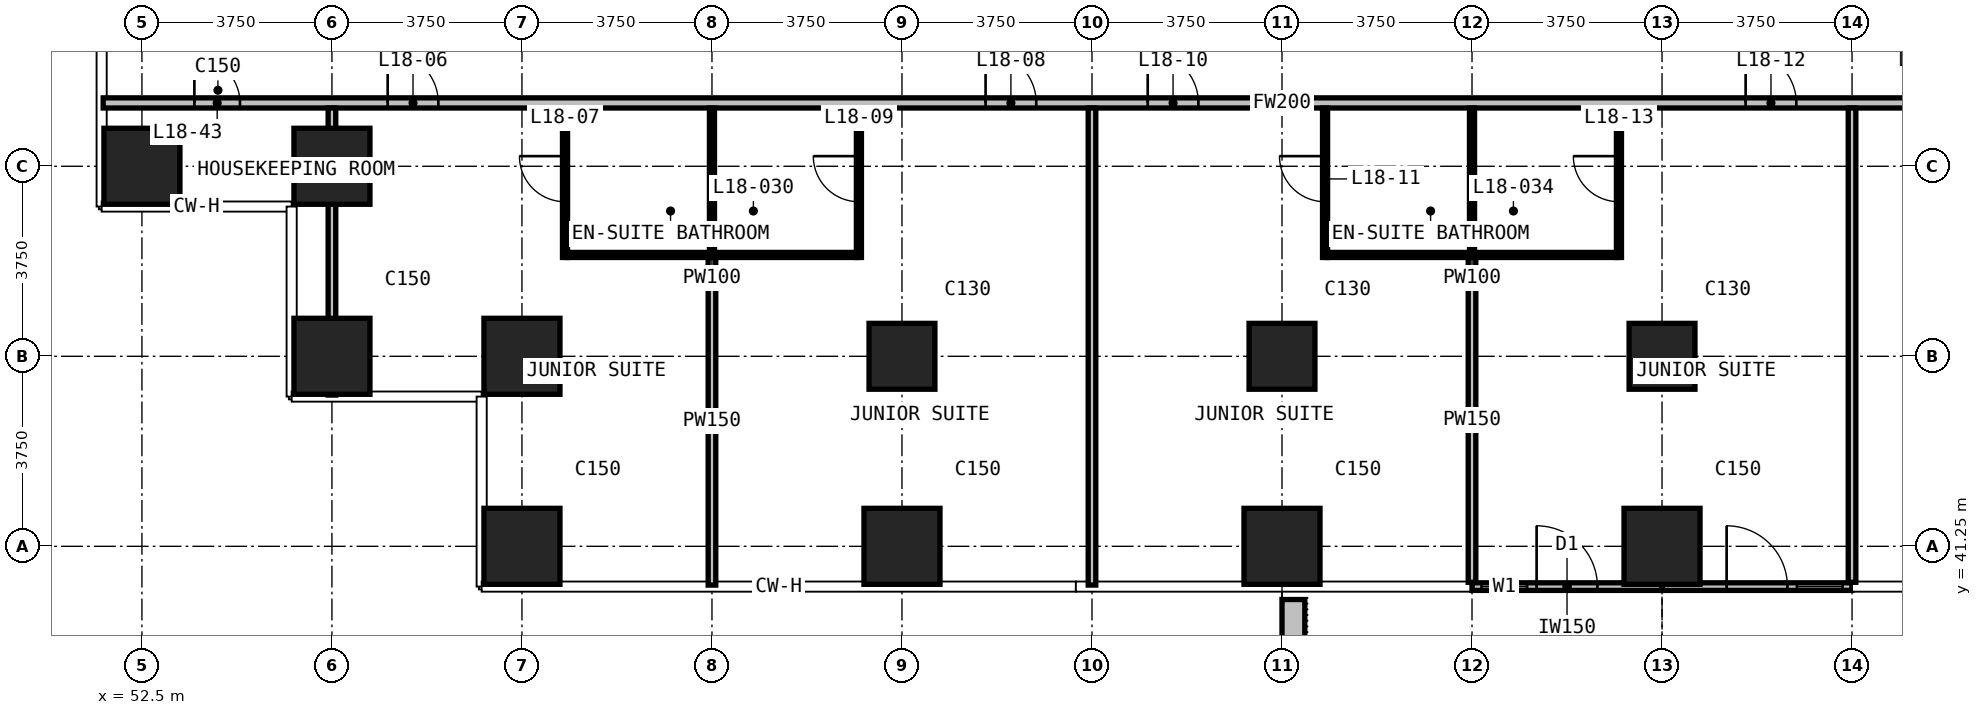
"""IFC4 building model, lengths in metres.
Left out: names, types, materials, properties, quantities, classifications, styles, units other than length and angle.
Written with IfcOpenShell. Run it as: python <this file> out.ifc"""

import sys

from ifc_helpers import new_model, si_unit, direction, frame, frame_2d, origin, origin_2d, place, context, subcontext, project, spatial, rectangle, extrude, element, fill, save


model = new_model("IFC4")
c1 = context("Model", 3, precision=1e-05, world=origin(), true_north=direction((0.0, 1.0)))
c2 = subcontext(c1, "Body", "Model", "MODEL_VIEW")
j1 = project(units=[si_unit("LENGTHUNIT", "METRE"), si_unit("PLANEANGLEUNIT", "RADIAN")], contexts=[c1])
p1 = place(None, origin())
s1 = spatial("IfcSite", under=j1, at=p1, CompositionType="ELEMENT")
p2 = place(p1, origin())
s2 = spatial("IfcBuilding", under=s1, at=p2, CompositionType="ELEMENT")
p3 = place(p2, frame((0.0, 0.0, 79.1)))
s3 = spatial("IfcBuildingStorey", under=s2, at=p3, CompositionType="ELEMENT", Elevation=79.1)
for number, where, z_axis, x_axis in (
    (1, (52.5, 48.75, 0.0), (0.0, 0.0, 1.0), (1.0, 0.0, 0.0)),
    (2, (56.25, 45.0, 0.0), (0.0, 0.0, 1.0), (1.0, 0.0, 0.0)),
    (3, (56.25, 48.75, 0.0), (0.0, 0.0, 1.0), (1.0, 0.0, 0.0)),
    (4, (60.0, 41.25, 0.0), (0.0, 0.0, 1.0), (1.0, 0.0, 0.0)),
    (5, (60.0, 45.0, 0.0), (0.0, 0.0, 1.0), (1.0, 0.0, 0.0)),
    (6, (67.5, 41.25, 0.0), (0.0, 0.0, 1.0), (1.0, 0.0, 0.0)),
):
    element("IfcColumn", number, at=place(p3, frame(where, z_axis=z_axis, x_axis=x_axis)), inside=s3, PredefinedType="COLUMN", context=c2, shape_type="SweptSolid", body=[
        extrude(rectangle(XDim=1.5, YDim=1.5, at=origin_2d()), origin(), (0.0, 0.0, 1.0), 3.3),
    ])
p4 = place(p3, frame((67.5, 45.0, 0.0), z_axis=(0.0, 0.0, 1.0), x_axis=(1.0, 0.0, 0.0)))
e7 = element("IfcColumn", 7, at=p4, inside=s3, PredefinedType="COLUMN", context=c2, shape_type="SweptSolid", body=[
    extrude(rectangle(XDim=1.3, YDim=1.3, at=origin_2d()), origin(), (0.0, 0.0, 1.0), 3.3),
])
p5 = place(p3, frame((75.0, 41.25, 0.0), z_axis=(0.0, 0.0, 1.0), x_axis=(1.0, 0.0, 0.0)))
e8 = element("IfcColumn", 8, at=p5, inside=s3, PredefinedType="COLUMN", context=c2, shape_type="SweptSolid", body=[
    extrude(rectangle(XDim=1.5, YDim=1.5, at=origin_2d()), origin(), (0.0, 0.0, 1.0), 3.3),
])
p6 = place(p3, frame((75.0, 45.0, 0.0), z_axis=(0.0, 0.0, 1.0), x_axis=(1.0, 0.0, 0.0)))
e9 = element("IfcColumn", 9, at=p6, inside=s3, PredefinedType="COLUMN", context=c2, shape_type="SweptSolid", body=[
    extrude(rectangle(XDim=1.3, YDim=1.3, at=origin_2d()), origin(), (0.0, 0.0, 1.0), 3.3),
])
p7 = place(p3, frame((82.5, 41.25, 0.0), z_axis=(0.0, 0.0, 1.0), x_axis=(1.0, 0.0, 0.0)))
e10 = element("IfcColumn", 10, at=p7, inside=s3, PredefinedType="COLUMN", context=c2, shape_type="SweptSolid", body=[
    extrude(rectangle(XDim=1.5, YDim=1.5, at=origin_2d()), origin(), (0.0, 0.0, 1.0), 3.3),
])
p8 = place(p3, frame((82.5, 45.0, 0.0), z_axis=(0.0, 0.0, 1.0), x_axis=(1.0, 0.0, 0.0)))
e11 = element("IfcColumn", 11, at=p8, inside=s3, PredefinedType="COLUMN", context=c2, shape_type="SweptSolid", body=[
    extrude(rectangle(XDim=1.3, YDim=1.3, at=origin_2d()), origin(), (0.0, 0.0, 1.0), 3.3),
])
p9 = place(p3, frame((78.75, 40.455, 0.0), z_axis=(0.0, 0.0, 1.0), x_axis=(1.0, 0.0, 0.0)))
e12 = element("IfcWall", 12, at=p9, inside=s3, PredefinedType="SOLIDWALL", context=c2, shape_type="SweptSolid", body=[
    extrude(rectangle(XDim=3.75, YDim=0.15, at=frame_2d((1.875, 0.0))), origin(), (0.0, 0.0, 1.0), 3.0),
])
p10 = place(p9, frame((0.188, 0.0, 0.1)))
e13 = element("IfcOpeningElement", 13, at=p10, cuts=e12, PredefinedType="OPENING", context=c2, shape_type="SweptSolid", body=[
    extrude(rectangle(XDim=0.9, YDim=2.4, at=frame_2d((0.45, 1.2))), frame((0.0, 0.085, 0.0), z_axis=(0.0, -1.0, 0.0), x_axis=(1.0, 0.0, 0.0)), (0.0, 0.0, 1.0), 0.17),
])
p11 = place(p9, frame((1.275, 0.0, 0.0)))
e14 = element("IfcOpeningElement", 14, at=p11, cuts=e12, PredefinedType="OPENING", context=c2, shape_type="SweptSolid", body=[
    extrude(rectangle(XDim=1.2, YDim=2.4, at=frame_2d((0.6, 1.2))), frame((0.0, 0.085, 0.0), z_axis=(0.0, -1.0, 0.0), x_axis=(1.0, 0.0, 0.0)), (0.0, 0.0, 1.0), 0.17),
])
p12 = place(p3, frame((82.5, 40.455, 0.0), z_axis=(0.0, 0.0, 1.0), x_axis=(1.0, 0.0, 0.0)))
e15 = element("IfcWall", 15, at=p12, inside=s3, PredefinedType="SOLIDWALL", context=c2, shape_type="SweptSolid", body=[
    extrude(rectangle(XDim=3.75, YDim=0.15, at=frame_2d((1.875, 0.0))), origin(), (0.0, 0.0, 1.0), 3.0),
])
p13 = place(p12, frame((1.275, 0.0, 0.0)))
e16 = element("IfcOpeningElement", 16, at=p13, cuts=e15, PredefinedType="OPENING", context=c2, shape_type="SweptSolid", body=[
    extrude(rectangle(XDim=1.2, YDim=2.4, at=frame_2d((0.6, 1.2))), frame((0.0, 0.085, 0.0), z_axis=(0.0, -1.0, 0.0), x_axis=(1.0, 0.0, 0.0)), (0.0, 0.0, 1.0), 0.17),
])
p14 = place(p12, frame((2.663, 0.0, 0.1)))
e17 = element("IfcOpeningElement", 17, at=p14, cuts=e15, PredefinedType="OPENING", context=c2, shape_type="SweptSolid", body=[
    extrude(rectangle(XDim=0.9, YDim=2.4, at=frame_2d((0.45, 1.2))), frame((0.0, 0.085, 0.0), z_axis=(0.0, -1.0, 0.0), x_axis=(1.0, 0.0, 0.0)), (0.0, 0.0, 1.0), 0.17),
])
p15 = place(p3, frame((75.225, 40.2, 0.0), z_axis=(0.0, 0.0, 1.0), x_axis=(0.0, -1.0, 0.0)))
e18 = element("IfcWall", 18, at=p15, inside=s3, PredefinedType="USERDEFINED", context=c2, shape_type="SweptSolid", body=[
    extrude(rectangle(XDim=2.35, YDim=0.45, at=frame_2d((1.175, 0.0))), origin(), (0.0, 0.0, 1.0), 1.1),
])
p16 = place(p3, frame((51.735, 50.0, 0.0), z_axis=(0.0, 0.0, 1.0), x_axis=(1.0, 0.0, 0.0)))
e19 = element("IfcWall", 19, at=p16, inside=s3, PredefinedType="PARTITIONING", context=c2, shape_type="SweptSolid", body=[
    extrude(rectangle(XDim=46.53, YDim=0.2, at=frame_2d((23.265, 0.0))), origin(), (0.0, 0.0, 1.0), 3.0),
])
p17 = place(p16, frame((5.615, 0.0, 0.0)))
e20 = element("IfcOpeningElement", 20, at=p17, cuts=e19, PredefinedType="OPENING", context=c2, shape_type="SweptSolid", body=[
    extrude(rectangle(XDim=1.0, YDim=2.2, at=frame_2d((0.5, 1.1))), frame((0.0, 0.11, 0.0), z_axis=(0.0, -1.0, 0.0), x_axis=(1.0, 0.0, 0.0)), (0.0, 0.0, 1.0), 0.22),
])
p18 = place(p16, frame((17.415, 0.0, 0.0)))
e21 = element("IfcOpeningElement", 21, at=p18, cuts=e19, PredefinedType="OPENING", context=c2, shape_type="SweptSolid", body=[
    extrude(rectangle(XDim=1.0, YDim=2.2, at=frame_2d((0.5, 1.1))), frame((0.0, 0.11, 0.0), z_axis=(0.0, -1.0, 0.0), x_axis=(1.0, 0.0, 0.0)), (0.0, 0.0, 1.0), 0.22),
])
p19 = place(p16, frame((20.615, 0.0, 0.0)))
e22 = element("IfcOpeningElement", 22, at=p19, cuts=e19, PredefinedType="OPENING", context=c2, shape_type="SweptSolid", body=[
    extrude(rectangle(XDim=1.0, YDim=2.2, at=frame_2d((0.5, 1.1))), frame((0.0, 0.11, 0.0), z_axis=(0.0, -1.0, 0.0), x_axis=(1.0, 0.0, 0.0)), (0.0, 0.0, 1.0), 0.22),
])
p20 = place(p16, frame((32.415, 0.0, 0.0)))
e23 = element("IfcOpeningElement", 23, at=p20, cuts=e19, PredefinedType="OPENING", context=c2, shape_type="SweptSolid", body=[
    extrude(rectangle(XDim=1.0, YDim=2.2, at=frame_2d((0.5, 1.1))), frame((0.0, 0.11, 0.0), z_axis=(0.0, -1.0, 0.0), x_axis=(1.0, 0.0, 0.0)), (0.0, 0.0, 1.0), 0.22),
])
p21 = place(p16, frame((35.615, 0.0, 0.0)))
e24 = element("IfcOpeningElement", 24, at=p21, cuts=e19, PredefinedType="OPENING", context=c2, shape_type="SweptSolid", body=[
    extrude(rectangle(XDim=1.0, YDim=2.2, at=frame_2d((0.5, 1.1))), frame((0.0, 0.11, 0.0), z_axis=(0.0, -1.0, 0.0), x_axis=(1.0, 0.0, 0.0)), (0.0, 0.0, 1.0), 0.22),
])
p22 = place(p16, frame((1.8, 0.0, 0.0)))
e25 = element("IfcOpeningElement", 25, at=p22, cuts=e19, PredefinedType="OPENING", context=c2, shape_type="SweptSolid", body=[
    extrude(rectangle(XDim=0.9, YDim=2.2, at=frame_2d((0.45, 1.1))), frame((0.0, 0.11, 0.0), z_axis=(0.0, -1.0, 0.0), x_axis=(1.0, 0.0, 0.0)), (0.0, 0.0, 1.0), 0.22),
])
p23 = place(p16, frame((43.815, 0.0, 0.0)))
e26 = element("IfcOpeningElement", 26, at=p23, cuts=e19, PredefinedType="OPENING", context=c2, shape_type="SweptSolid", body=[
    extrude(rectangle(XDim=0.9, YDim=2.2, at=frame_2d((0.45, 1.1))), frame((0.0, 0.11, 0.0), z_axis=(0.0, -1.0, 0.0), x_axis=(1.0, 0.0, 0.0)), (0.0, 0.0, 1.0), 0.22),
])
p24 = place(p3, frame((56.25, 44.235, 0.0), z_axis=(0.0, 0.0, 1.0), x_axis=(0.0, 1.0, 0.0)))
e27 = element("IfcWall", 27, at=p24, inside=s3, PredefinedType="PARTITIONING", context=c2, shape_type="SweptSolid", body=[
    extrude(rectangle(XDim=5.665, YDim=0.15, at=frame_2d((2.833, 0.0))), origin(), (0.0, 0.0, 1.0), 3.0),
])
p25 = place(p3, frame((63.75, 40.485, 0.0), z_axis=(0.0, 0.0, 1.0), x_axis=(0.0, 1.0, 0.0)))
e28 = element("IfcWall", 28, at=p25, inside=s3, PredefinedType="PARTITIONING", context=c2, shape_type="SweptSolid", body=[
    extrude(rectangle(XDim=6.465, YDim=0.15, at=frame_2d((3.232, 0.0))), origin(), (0.0, 0.0, 1.0), 3.0),
])
p26 = place(p3, frame((71.25, 40.485, 0.0), z_axis=(0.0, 0.0, 1.0), x_axis=(0.0, 1.0, 0.0)))
e29 = element("IfcWall", 29, at=p26, inside=s3, PredefinedType="PARTITIONING", context=c2, shape_type="SweptSolid", body=[
    extrude(rectangle(XDim=9.415, YDim=0.15, at=frame_2d((4.708, 0.0))), origin(), (0.0, 0.0, 1.0), 3.0),
])
p27 = place(p3, frame((78.75, 40.54, 0.0), z_axis=(0.0, 0.0, 1.0), x_axis=(0.0, 1.0, 0.0)))
e30 = element("IfcWall", 30, at=p27, inside=s3, PredefinedType="PARTITIONING", context=c2, shape_type="SweptSolid", body=[
    extrude(rectangle(XDim=6.41, YDim=0.15, at=frame_2d((3.205, 0.0))), origin(), (0.0, 0.0, 1.0), 3.0),
])
p28 = place(p3, frame((86.25, 40.54, 0.0), z_axis=(0.0, 0.0, 1.0), x_axis=(0.0, 1.0, 0.0)))
e31 = element("IfcWall", 31, at=p28, inside=s3, PredefinedType="PARTITIONING", context=c2, shape_type="SweptSolid", body=[
    extrude(rectangle(XDim=9.36, YDim=0.15, at=frame_2d((4.68, 0.0))), origin(), (0.0, 0.0, 1.0), 3.0),
])
for number, where, z_axis, x_axis in (
    (32, (60.9, 47.0, 0.0), (0.0, 0.0, 1.0), (1.0, 0.0, 0.0)),
    (33, (75.9, 47.0, 0.0), (0.0, 0.0, 1.0), (1.0, 0.0, 0.0)),
):
    element("IfcWall", number, at=place(p3, frame(where, z_axis=z_axis, x_axis=x_axis)), inside=s3, PredefinedType="PARTITIONING", context=c2, shape_type="SweptSolid", body=[
        extrude(rectangle(XDim=5.7, YDim=0.1, at=frame_2d((2.85, 0.0))), origin(), (0.0, 0.0, 1.0), 3.0),
    ])
p29 = place(p3, frame((60.85, 46.95, 0.0), z_axis=(0.0, 0.0, 1.0), x_axis=(0.0, 1.0, 0.0)))
e34 = element("IfcWall", 34, at=p29, inside=s3, PredefinedType="PARTITIONING", context=c2, shape_type="SweptSolid", body=[
    extrude(rectangle(XDim=2.95, YDim=0.1, at=frame_2d((1.475, 0.0))), origin(), (0.0, 0.0, 1.0), 3.0),
])
p30 = place(p29, frame((1.1, 0.0, 0.0)))
e35 = element("IfcOpeningElement", 35, at=p30, cuts=e34, PredefinedType="OPENING", context=c2, shape_type="SweptSolid", body=[
    extrude(rectangle(XDim=0.9, YDim=2.2, at=frame_2d((0.45, 1.1))), frame((0.0, 0.06, 0.0), z_axis=(0.0, -1.0, 0.0), x_axis=(1.0, 0.0, 0.0)), (0.0, 0.0, 1.0), 0.12),
])
p31 = place(p3, frame((63.75, 47.05, 0.0), z_axis=(0.0, 0.0, 1.0), x_axis=(0.0, 1.0, 0.0)))
e36 = element("IfcWall", 36, at=p31, inside=s3, PredefinedType="PARTITIONING", context=c2, shape_type="SweptSolid", body=[
    extrude(rectangle(XDim=2.85, YDim=0.1, at=frame_2d((1.425, 0.0))), origin(), (0.0, 0.0, 1.0), 3.0),
])
p32 = place(p3, frame((66.65, 46.95, 0.0), z_axis=(0.0, 0.0, 1.0), x_axis=(0.0, 1.0, 0.0)))
e37 = element("IfcWall", 37, at=p32, inside=s3, PredefinedType="PARTITIONING", context=c2, shape_type="SweptSolid", body=[
    extrude(rectangle(XDim=2.95, YDim=0.1, at=frame_2d((1.475, 0.0))), origin(), (0.0, 0.0, 1.0), 3.0),
])
p33 = place(p32, frame((1.1, 0.0, 0.0)))
e38 = element("IfcOpeningElement", 38, at=p33, cuts=e37, PredefinedType="OPENING", context=c2, shape_type="SweptSolid", body=[
    extrude(rectangle(XDim=0.9, YDim=2.2, at=frame_2d((0.45, 1.1))), frame((0.0, 0.06, 0.0), z_axis=(0.0, -1.0, 0.0), x_axis=(1.0, 0.0, 0.0)), (0.0, 0.0, 1.0), 0.12),
])
p34 = place(p3, frame((75.85, 46.95, 0.0), z_axis=(0.0, 0.0, 1.0), x_axis=(0.0, 1.0, 0.0)))
e39 = element("IfcWall", 39, at=p34, inside=s3, PredefinedType="PARTITIONING", context=c2, shape_type="SweptSolid", body=[
    extrude(rectangle(XDim=2.95, YDim=0.1, at=frame_2d((1.475, 0.0))), origin(), (0.0, 0.0, 1.0), 3.0),
])
p35 = place(p34, frame((1.1, 0.0, 0.0)))
e40 = element("IfcOpeningElement", 40, at=p35, cuts=e39, PredefinedType="OPENING", context=c2, shape_type="SweptSolid", body=[
    extrude(rectangle(XDim=0.9, YDim=2.2, at=frame_2d((0.45, 1.1))), frame((0.0, 0.06, 0.0), z_axis=(0.0, -1.0, 0.0), x_axis=(1.0, 0.0, 0.0)), (0.0, 0.0, 1.0), 0.12),
])
p36 = place(p3, frame((78.75, 47.05, 0.0), z_axis=(0.0, 0.0, 1.0), x_axis=(0.0, 1.0, 0.0)))
e41 = element("IfcWall", 41, at=p36, inside=s3, PredefinedType="PARTITIONING", context=c2, shape_type="SweptSolid", body=[
    extrude(rectangle(XDim=2.85, YDim=0.1, at=frame_2d((1.425, 0.0))), origin(), (0.0, 0.0, 1.0), 3.0),
])
p37 = place(p3, frame((81.65, 46.95, 0.0), z_axis=(0.0, 0.0, 1.0), x_axis=(0.0, 1.0, 0.0)))
e42 = element("IfcWall", 42, at=p37, inside=s3, PredefinedType="PARTITIONING", context=c2, shape_type="SweptSolid", body=[
    extrude(rectangle(XDim=2.95, YDim=0.1, at=frame_2d((1.475, 0.0))), origin(), (0.0, 0.0, 1.0), 3.0),
])
p38 = place(p37, frame((1.1, 0.0, 0.0)))
e43 = element("IfcOpeningElement", 43, at=p38, cuts=e42, PredefinedType="OPENING", context=c2, shape_type="SweptSolid", body=[
    extrude(rectangle(XDim=0.9, YDim=2.2, at=frame_2d((0.45, 1.1))), frame((0.0, 0.06, 0.0), z_axis=(0.0, -1.0, 0.0), x_axis=(1.0, 0.0, 0.0)), (0.0, 0.0, 1.0), 0.12),
])
p39 = place(p10, origin())
e44 = element("IfcWindow", 44, at=p39, inside=s3, PartitioningType="SINGLE_PANEL", PredefinedType="WINDOW", context=c2, shape_type="SweptSolid", body=[
    extrude(rectangle(XDim=0.9, YDim=2.4, at=frame_2d((0.45, 1.2))), frame((0.0, 0.03, 0.0), z_axis=(0.0, -1.0, 0.0), x_axis=(1.0, 0.0, 0.0)), (0.0, 0.0, 1.0), 0.06),
])
fill(e13, e44)
p40 = place(p11, origin())
e45 = element("IfcDoor", 45, at=p40, inside=s3, OperationType="SINGLE_SWING_LEFT", PredefinedType="DOOR", context=c2, shape_type="SweptSolid", body=[
    extrude(rectangle(XDim=1.2, YDim=2.4, at=frame_2d((0.6, 1.2))), frame((0.0, 0.025, 0.0), z_axis=(0.0, -1.0, 0.0), x_axis=(1.0, 0.0, 0.0)), (0.0, 0.0, 1.0), 0.05),
])
fill(e14, e45)
p41 = place(p13, origin())
e46 = element("IfcDoor", 46, at=p41, inside=s3, OperationType="SINGLE_SWING_LEFT", PredefinedType="DOOR", context=c2, shape_type="SweptSolid", body=[
    extrude(rectangle(XDim=1.2, YDim=2.4, at=frame_2d((0.6, 1.2))), frame((0.0, 0.025, 0.0), z_axis=(0.0, -1.0, 0.0), x_axis=(1.0, 0.0, 0.0)), (0.0, 0.0, 1.0), 0.05),
])
fill(e16, e46)
p42 = place(p14, origin())
e47 = element("IfcWindow", 47, at=p42, inside=s3, PartitioningType="SINGLE_PANEL", PredefinedType="WINDOW", context=c2, shape_type="SweptSolid", body=[
    extrude(rectangle(XDim=0.9, YDim=2.4, at=frame_2d((0.45, 1.2))), frame((0.0, 0.03, 0.0), z_axis=(0.0, -1.0, 0.0), x_axis=(1.0, 0.0, 0.0)), (0.0, 0.0, 1.0), 0.06),
])
fill(e17, e47)
p43 = place(p17, origin())
e48 = element("IfcDoor", 48, at=p43, inside=s3, OperationType="SINGLE_SWING_LEFT", PredefinedType="DOOR", context=c2, shape_type="SweptSolid", body=[
    extrude(rectangle(XDim=1.0, YDim=2.2, at=frame_2d((0.5, 1.1))), frame((0.0, 0.025, 0.0), z_axis=(0.0, -1.0, 0.0), x_axis=(1.0, 0.0, 0.0)), (0.0, 0.0, 1.0), 0.05),
])
fill(e20, e48)
p44 = place(p30, origin())
e49 = element("IfcDoor", 49, at=p44, inside=s3, OperationType="SINGLE_SWING_RIGHT", PredefinedType="DOOR", context=c2, shape_type="SweptSolid", body=[
    extrude(rectangle(XDim=0.9, YDim=2.2, at=frame_2d((0.45, 1.1))), frame((0.0, 0.025, 0.0), z_axis=(0.0, -1.0, 0.0), x_axis=(1.0, 0.0, 0.0)), (0.0, 0.0, 1.0), 0.05),
])
fill(e35, e49)
p45 = place(p18, origin())
e50 = element("IfcDoor", 50, at=p45, inside=s3, OperationType="SINGLE_SWING_RIGHT", PredefinedType="DOOR", context=c2, shape_type="SweptSolid", body=[
    extrude(rectangle(XDim=1.0, YDim=2.2, at=frame_2d((0.5, 1.1))), frame((0.0, 0.025, 0.0), z_axis=(0.0, -1.0, 0.0), x_axis=(1.0, 0.0, 0.0)), (0.0, 0.0, 1.0), 0.05),
])
fill(e21, e50)
p46 = place(p33, origin())
e51 = element("IfcDoor", 51, at=p46, inside=s3, OperationType="SINGLE_SWING_RIGHT", PredefinedType="DOOR", context=c2, shape_type="SweptSolid", body=[
    extrude(rectangle(XDim=0.9, YDim=2.2, at=frame_2d((0.45, 1.1))), frame((0.0, 0.025, 0.0), z_axis=(0.0, -1.0, 0.0), x_axis=(1.0, 0.0, 0.0)), (0.0, 0.0, 1.0), 0.05),
])
fill(e38, e51)
p47 = place(p19, origin())
e52 = element("IfcDoor", 52, at=p47, inside=s3, OperationType="SINGLE_SWING_RIGHT", PredefinedType="DOOR", context=c2, shape_type="SweptSolid", body=[
    extrude(rectangle(XDim=1.0, YDim=2.2, at=frame_2d((0.5, 1.1))), frame((0.0, 0.025, 0.0), z_axis=(0.0, -1.0, 0.0), x_axis=(1.0, 0.0, 0.0)), (0.0, 0.0, 1.0), 0.05),
])
fill(e22, e52)
p48 = place(p35, origin())
e53 = element("IfcDoor", 53, at=p48, inside=s3, OperationType="SINGLE_SWING_RIGHT", PredefinedType="DOOR", context=c2, shape_type="SweptSolid", body=[
    extrude(rectangle(XDim=0.9, YDim=2.2, at=frame_2d((0.45, 1.1))), frame((0.0, 0.025, 0.0), z_axis=(0.0, -1.0, 0.0), x_axis=(1.0, 0.0, 0.0)), (0.0, 0.0, 1.0), 0.05),
])
fill(e40, e53)
p49 = place(p20, origin())
e54 = element("IfcDoor", 54, at=p49, inside=s3, OperationType="SINGLE_SWING_RIGHT", PredefinedType="DOOR", context=c2, shape_type="SweptSolid", body=[
    extrude(rectangle(XDim=1.0, YDim=2.2, at=frame_2d((0.5, 1.1))), frame((0.0, 0.025, 0.0), z_axis=(0.0, -1.0, 0.0), x_axis=(1.0, 0.0, 0.0)), (0.0, 0.0, 1.0), 0.05),
])
fill(e23, e54)
p50 = place(p38, origin())
e55 = element("IfcDoor", 55, at=p50, inside=s3, OperationType="SINGLE_SWING_RIGHT", PredefinedType="DOOR", context=c2, shape_type="SweptSolid", body=[
    extrude(rectangle(XDim=0.9, YDim=2.2, at=frame_2d((0.45, 1.1))), frame((0.0, 0.025, 0.0), z_axis=(0.0, -1.0, 0.0), x_axis=(1.0, 0.0, 0.0)), (0.0, 0.0, 1.0), 0.05),
])
fill(e43, e55)
p51 = place(p22, origin())
e56 = element("IfcDoor", 56, at=p51, inside=s3, OperationType="SINGLE_SWING_RIGHT", PredefinedType="DOOR", context=c2, shape_type="SweptSolid", body=[
    extrude(rectangle(XDim=0.9, YDim=2.2, at=frame_2d((0.45, 1.1))), frame((0.0, 0.025, 0.0), z_axis=(0.0, -1.0, 0.0), x_axis=(1.0, 0.0, 0.0)), (0.0, 0.0, 1.0), 0.05),
])
fill(e25, e56)
save(model, sys.argv[1])
